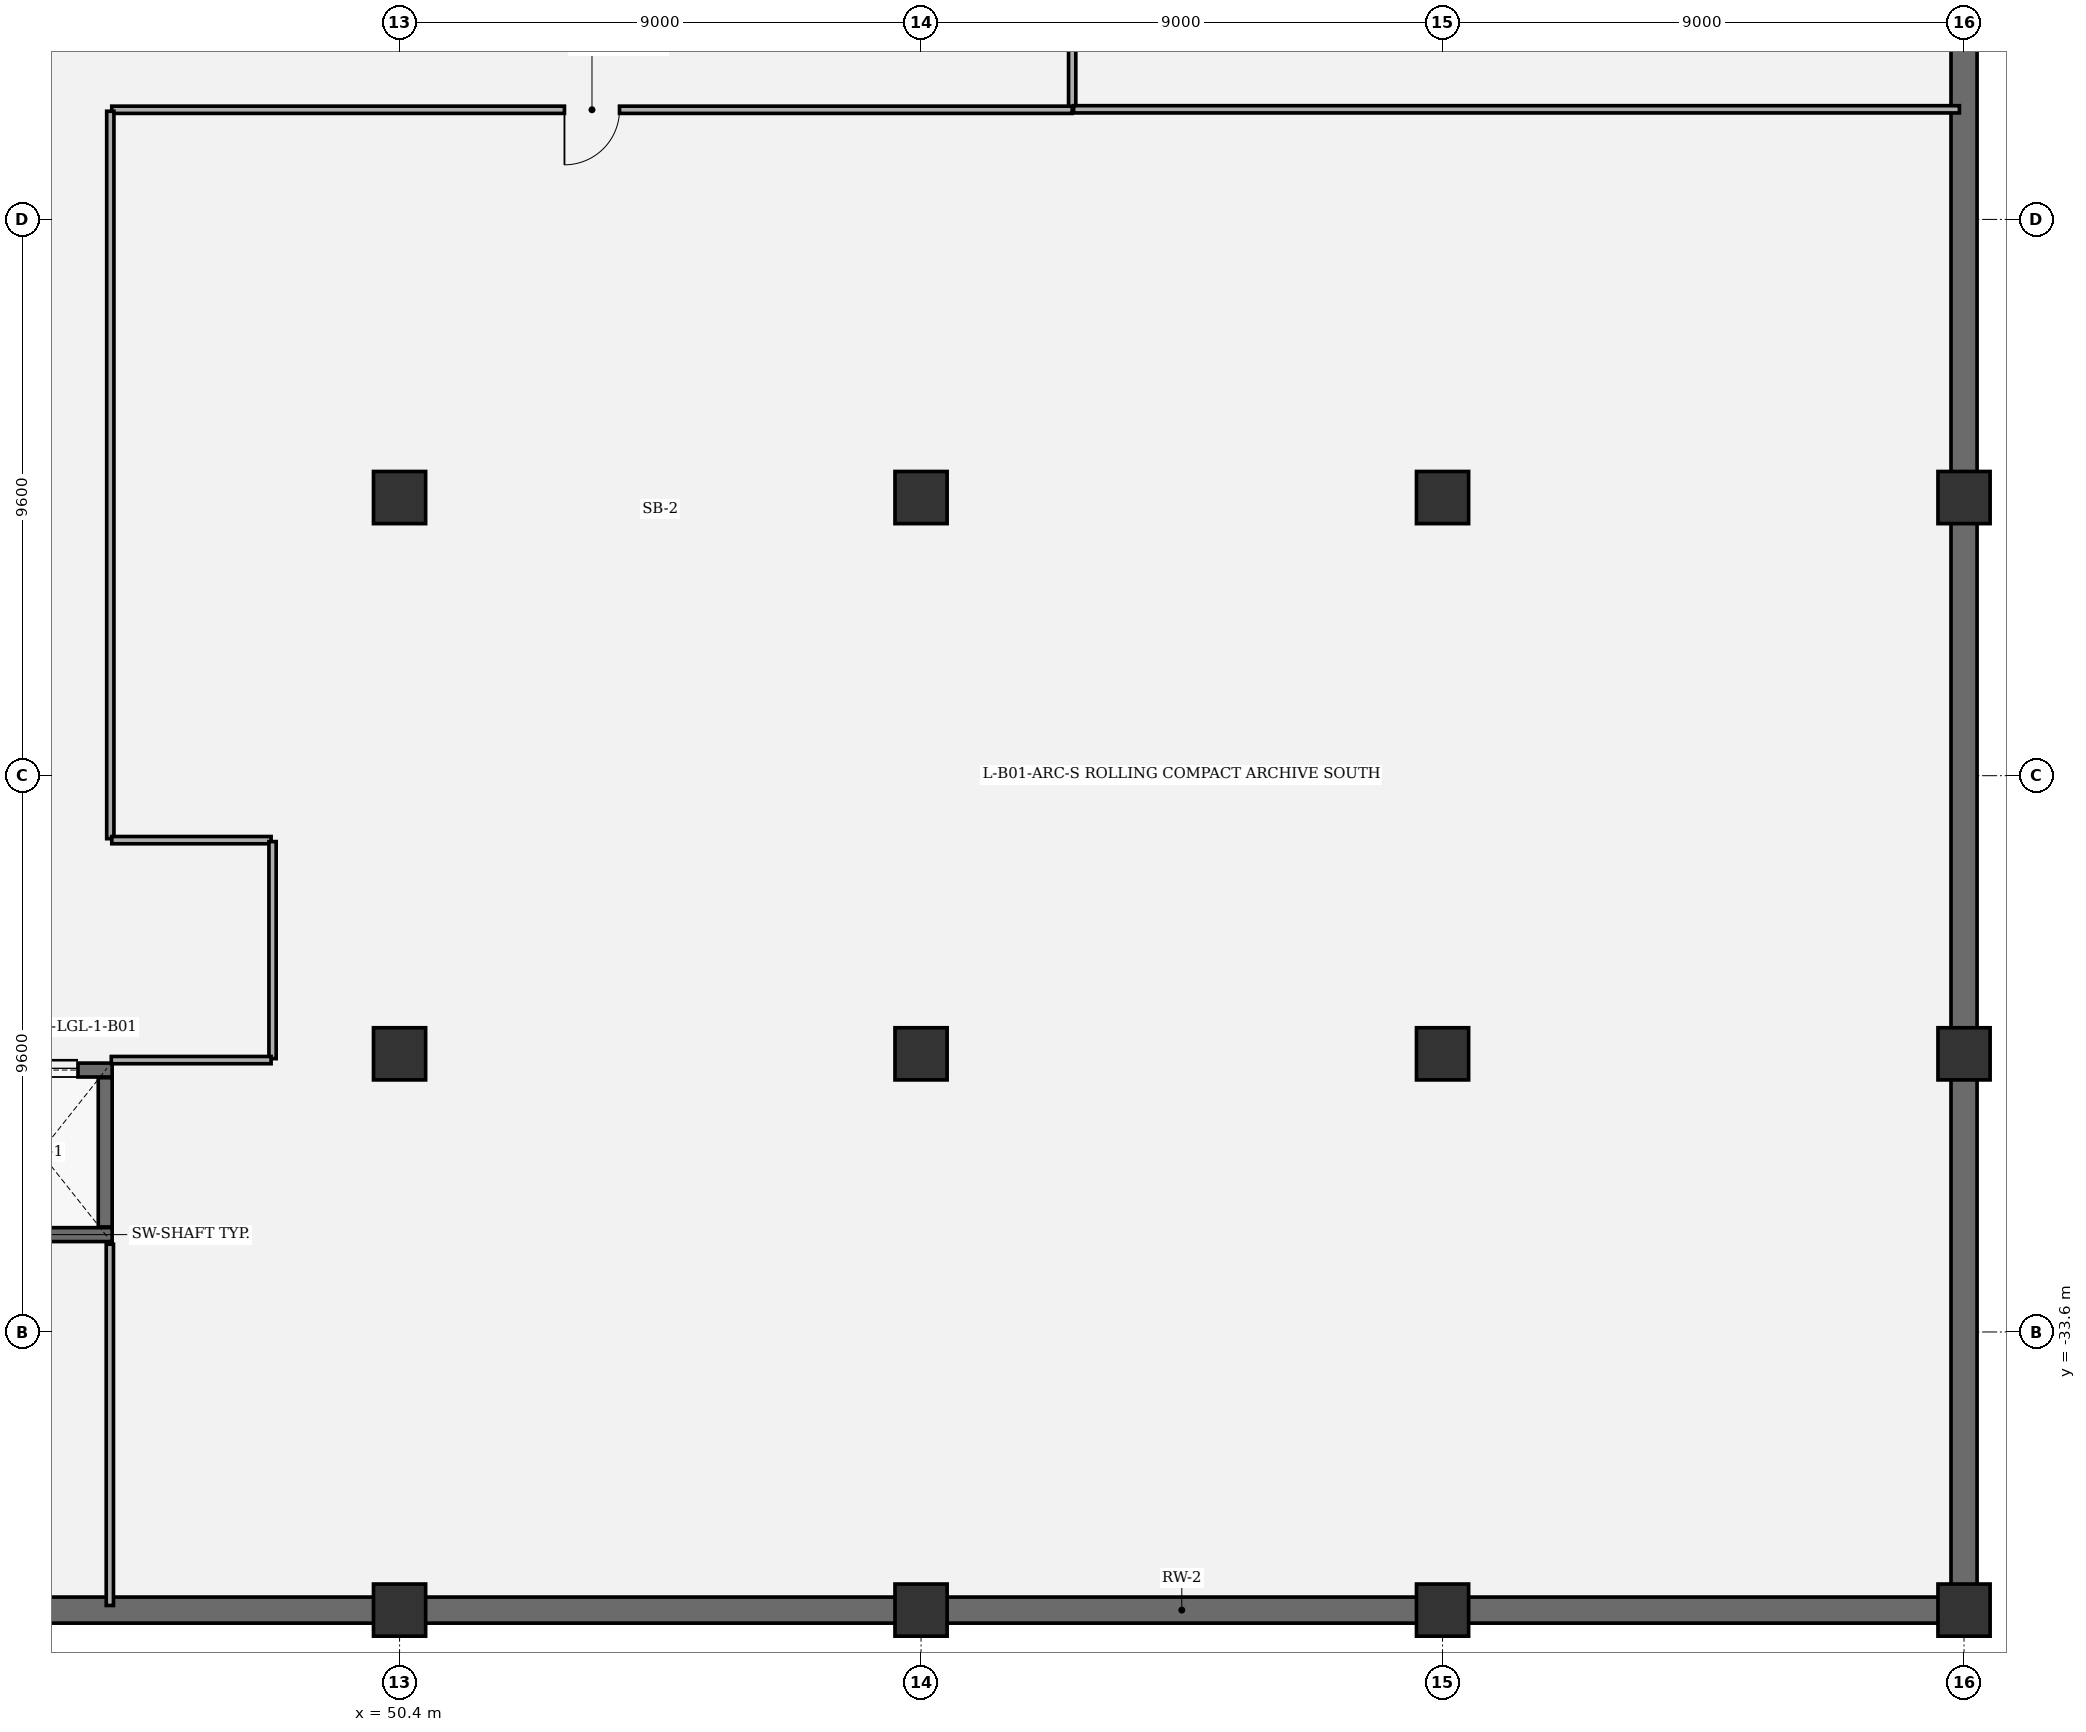
"""IFC4 building model, lengths in metres.
Left out: names, types, materials, properties, quantities, classifications, styles, units other than length and angle.
Written with IfcOpenShell. Run it as: python <this file> out.ifc"""

import sys

from ifc_helpers import new_model, si_unit, direction, frame, frame_2d, origin, origin_2d, place, context, subcontext, project, spatial, rectangle, extrude, element, fill, save


model = new_model("IFC4")
c1 = context("Model", 3, precision=1e-05, world=origin(), true_north=direction((0.0, 1.0)))
c2 = subcontext(c1, "Body", "Model", "MODEL_VIEW")
j1 = project(units=[si_unit("LENGTHUNIT", "METRE"), si_unit("PLANEANGLEUNIT", "RADIAN")], contexts=[c1])
p1 = place(None, origin())
s1 = spatial("IfcSite", under=j1, at=p1, CompositionType="ELEMENT")
p2 = place(p1, origin())
s2 = spatial("IfcBuilding", under=s1, at=p2, CompositionType="ELEMENT")
p3 = place(p2, frame((0.0, 0.0, -5.4)))
s3 = spatial("IfcBuildingStorey", under=s2, at=p3, CompositionType="ELEMENT", Elevation=-5.4)
p4 = place(p3, frame((32.4, -38.4, 0.0), z_axis=(0.0, 0.0, 1.0), x_axis=(1.0, 0.0, 0.0)))
e1 = element("IfcWall", 1, at=p4, inside=s3, PredefinedType="USERDEFINED", context=c2, shape_type="SweptSolid", body=[
    extrude(rectangle(XDim=45.0, YDim=0.45, at=frame_2d((22.5, 0.0))), origin(), (0.0, 0.0, 1.0), 4.35),
])
p5 = place(p3, frame((77.4, -38.16, 0.0), z_axis=(0.0, 0.0, 1.0), x_axis=(0.0, 1.0, 0.0)))
e2 = element("IfcWall", 2, at=p5, inside=s3, PredefinedType="USERDEFINED", context=c2, shape_type="SweptSolid", body=[
    extrude(rectangle(XDim=76.32, YDim=0.45, at=frame_2d((38.16, 0.0))), origin(), (0.0, 0.0, 1.0), 4.35),
])
for number, where, z_axis, x_axis in (
    (3, (50.4, -38.4, 0.0), (0.0, 0.0, 1.0), (1.0, 0.0, 0.0)),
    (4, (50.4, -28.8, 0.0), (0.0, 0.0, 1.0), (1.0, 0.0, 0.0)),
    (5, (50.4, -19.2, 0.0), (0.0, 0.0, 1.0), (1.0, 0.0, 0.0)),
    (6, (59.4, -38.4, 0.0), (0.0, 0.0, 1.0), (1.0, 0.0, 0.0)),
    (7, (59.4, -28.8, 0.0), (0.0, 0.0, 1.0), (1.0, 0.0, 0.0)),
    (8, (59.4, -19.2, 0.0), (0.0, 0.0, 1.0), (1.0, 0.0, 0.0)),
    (9, (68.4, -38.4, 0.0), (0.0, 0.0, 1.0), (1.0, 0.0, 0.0)),
    (10, (68.4, -28.8, 0.0), (0.0, 0.0, 1.0), (1.0, 0.0, 0.0)),
    (11, (68.4, -19.2, 0.0), (0.0, 0.0, 1.0), (1.0, 0.0, 0.0)),
    (12, (77.4, -38.4, 0.0), (0.0, 0.0, 1.0), (1.0, 0.0, 0.0)),
    (13, (77.4, -28.8, 0.0), (0.0, 0.0, 1.0), (1.0, 0.0, 0.0)),
    (14, (77.4, -19.2, 0.0), (0.0, 0.0, 1.0), (1.0, 0.0, 0.0)),
):
    element("IfcColumn", number, at=place(p3, frame(where, z_axis=z_axis, x_axis=x_axis)), inside=s3, PredefinedType="COLUMN", context=c2, shape_type="SweptSolid", body=[
        extrude(rectangle(XDim=0.9, YDim=0.9, at=origin_2d()), origin(), (0.0, 0.0, 1.0), 5.4),
    ])
p6 = place(p3, frame((45.44, -31.92, 0.0), z_axis=(0.0, 0.0, 1.0), x_axis=(-1.0, 0.0, 0.0)))
e15 = element("IfcWall", 15, at=p6, inside=s3, PredefinedType="SHEAR", context=c2, shape_type="SweptSolid", body=[
    extrude(rectangle(XDim=2.48, YDim=0.24, at=frame_2d((1.24, 0.0))), origin(), (0.0, 0.0, 1.0), 5.1),
])
p7 = place(p3, frame((42.96, -29.08, 0.0), z_axis=(0.0, 0.0, 1.0), x_axis=(1.0, 0.0, 0.0)))
e16 = element("IfcWall", 16, at=p7, inside=s3, PredefinedType="SHEAR", context=c2, shape_type="SweptSolid", body=[
    extrude(rectangle(XDim=2.48, YDim=0.24, at=frame_2d((1.24, 0.0))), origin(), (0.0, 0.0, 1.0), 5.1),
])
p8 = place(p7, frame((0.59, 0.0, 0.0)))
e17 = element("IfcOpeningElement", 17, at=p8, cuts=e16, PredefinedType="OPENING", context=c2, shape_type="SweptSolid", body=[
    extrude(rectangle(XDim=1.3, YDim=2.3, at=frame_2d((0.65, 1.15))), frame((0.0, 0.13, 0.0), z_axis=(0.0, -1.0, 0.0), x_axis=(1.0, 0.0, 0.0)), (0.0, 0.0, 1.0), 0.26),
])
p9 = place(p3, frame((45.32, -29.212, 0.0), z_axis=(0.0, 0.0, 1.0), x_axis=(0.0, -1.0, 0.0)))
e18 = element("IfcWall", 18, at=p9, inside=s3, PredefinedType="SHEAR", context=c2, shape_type="SweptSolid", body=[
    extrude(rectangle(XDim=2.576, YDim=0.24, at=frame_2d((1.288, 0.0))), origin(), (0.0, 0.0, 1.0), 5.1),
])
p10 = place(p3, frame((62.008, -9.217, 0.0), z_axis=(0.0, 0.0, 1.0), x_axis=(0.0, -1.0, 0.0)))
e19 = element("IfcWall", 19, at=p10, inside=s3, PredefinedType="PARTITIONING", context=c2, shape_type="SweptSolid", body=[
    extrude(rectangle(XDim=3.258, YDim=0.125, at=frame_2d((1.629, 0.0))), origin(), (0.0, 0.0, 1.0), 5.1),
])
p11 = place(p3, frame((62.033, -12.5, 0.0), z_axis=(0.0, 0.0, 1.0), x_axis=(1.0, 0.0, 0.0)))
e20 = element("IfcWall", 20, at=p11, inside=s3, PredefinedType="PARTITIONING", context=c2, shape_type="SweptSolid", body=[
    extrude(rectangle(XDim=15.287, YDim=0.125, at=frame_2d((7.644, 0.0))), origin(), (0.0, 0.0, 1.0), 5.1),
])
p12 = place(p3, frame((62.008, -12.508, 0.0), z_axis=(0.0, 0.0, 1.0), x_axis=(-1.0, 0.0, 0.0)))
e21 = element("IfcWall", 21, at=p12, inside=s3, PredefinedType="PARTITIONING", context=c2, shape_type="SweptSolid", body=[
    extrude(rectangle(XDim=16.575, YDim=0.125, at=frame_2d((8.288, 0.0))), origin(), (0.0, 0.0, 1.0), 5.1),
])
p13 = place(p12, frame((7.812, 0.0, 0.0)))
e22 = element("IfcOpeningElement", 22, at=p13, cuts=e21, PredefinedType="OPENING", context=c2, shape_type="SweptSolid", body=[
    extrude(rectangle(XDim=0.95, YDim=2.15, at=frame_2d((0.475, 1.075))), frame((0.0, 0.073, 0.0), z_axis=(0.0, -1.0, 0.0), x_axis=(1.0, 0.0, 0.0)), (0.0, 0.0, 1.0), 0.145),
])
p14 = place(p3, frame((45.408, -12.533, 0.0), z_axis=(0.0, 0.0, 1.0), x_axis=(0.0, -1.0, 0.0)))
e23 = element("IfcWall", 23, at=p14, inside=s3, PredefinedType="PARTITIONING", context=c2, shape_type="SweptSolid", body=[
    extrude(rectangle(XDim=12.554, YDim=0.125, at=frame_2d((6.277, 0.0))), origin(), (0.0, 0.0, 1.0), 5.1),
])
p15 = place(p3, frame((48.183, -25.112, 0.0), z_axis=(0.0, 0.0, 1.0), x_axis=(-1.0, 0.0, 0.0)))
e24 = element("IfcWall", 24, at=p15, inside=s3, PredefinedType="PARTITIONING", context=c2, shape_type="SweptSolid", body=[
    extrude(rectangle(XDim=2.75, YDim=0.125, at=frame_2d((1.375, 0.0))), origin(), (0.0, 0.0, 1.0), 5.1),
])
p16 = place(p3, frame((48.208, -25.137, 0.0), z_axis=(0.0, 0.0, 1.0), x_axis=(0.0, -1.0, 0.0)))
e25 = element("IfcWall", 25, at=p16, inside=s3, PredefinedType="PARTITIONING", context=c2, shape_type="SweptSolid", body=[
    extrude(rectangle(XDim=3.746, YDim=0.125, at=frame_2d((1.873, 0.0))), origin(), (0.0, 0.0, 1.0), 5.1),
])
p17 = place(p3, frame((45.425, -28.908, 0.0), z_axis=(0.0, 0.0, 1.0), x_axis=(1.0, 0.0, 0.0)))
e26 = element("IfcWall", 26, at=p17, inside=s3, PredefinedType="PARTITIONING", context=c2, shape_type="SweptSolid", body=[
    extrude(rectangle(XDim=2.758, YDim=0.125, at=frame_2d((1.379, 0.0))), origin(), (0.0, 0.0, 1.0), 4.374),
])
p18 = place(p3, frame((45.4, -32.085, 0.0), z_axis=(0.0, 0.0, 1.0), x_axis=(0.0, -1.0, 0.0)))
e27 = element("IfcWall", 27, at=p18, inside=s3, PredefinedType="PARTITIONING", context=c2, shape_type="SweptSolid", body=[
    extrude(rectangle(XDim=6.235, YDim=0.125, at=frame_2d((3.118, 0.0))), origin(), (0.0, 0.0, 1.0), 5.1),
])
p19 = place(p8, origin())
e28 = element("IfcDoor", 28, at=p19, inside=s3, OperationType="DOUBLE_DOOR_SLIDING", PredefinedType="DOOR", context=c2, shape_type="SweptSolid", body=[
    extrude(rectangle(XDim=1.3, YDim=2.3, at=frame_2d((0.65, 1.15))), frame((0.0, 0.025, 0.0), z_axis=(0.0, -1.0, 0.0), x_axis=(1.0, 0.0, 0.0)), (0.0, 0.0, 1.0), 0.05),
])
fill(e17, e28)
p20 = place(p13, origin())
e29 = element("IfcDoor", 29, at=p20, inside=s3, OperationType="SINGLE_SWING_RIGHT", PredefinedType="DOOR", context=c2, shape_type="SweptSolid", body=[
    extrude(rectangle(XDim=0.95, YDim=2.15, at=frame_2d((0.475, 1.075))), frame((0.0, 0.025, 0.0), z_axis=(0.0, -1.0, 0.0), x_axis=(1.0, 0.0, 0.0)), (0.0, 0.0, 1.0), 0.05),
])
fill(e22, e29)
save(model, sys.argv[1])
